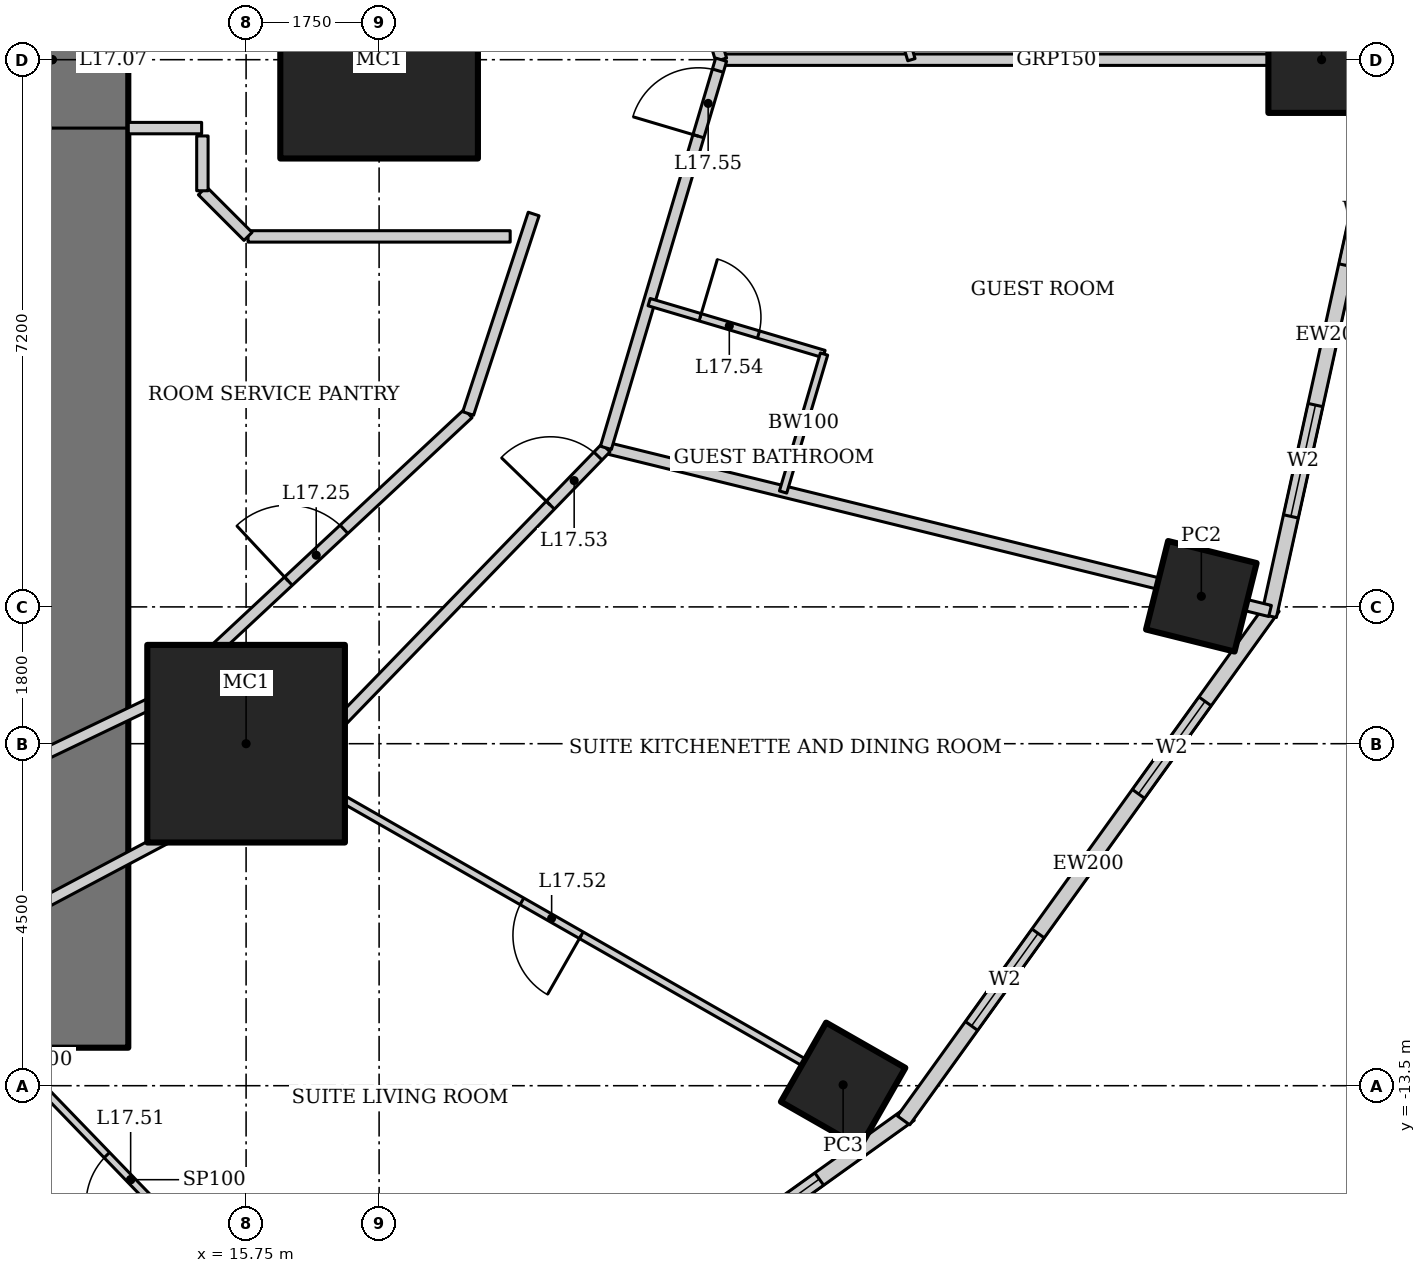
"""IFC4 building model, lengths in metres.
Left out: names, types, materials, properties, quantities, classifications, styles, units other than length and angle.
Written with IfcOpenShell. Run it as: python <this file> out.ifc"""

import sys

from ifc_helpers import new_model, si_unit, direction, frame, frame_2d, origin, origin_2d, place, context, subcontext, project, spatial, rectangle, hollow_rectangle, extrude, element, fill, save


model = new_model("IFC4")
c1 = context("Model", 3, precision=1e-05, world=origin(), true_north=direction((0.0, 1.0)))
c2 = subcontext(c1, "Body", "Model", "MODEL_VIEW")
j1 = project(units=[si_unit("LENGTHUNIT", "METRE"), si_unit("PLANEANGLEUNIT", "RADIAN")], contexts=[c1])
p1 = place(None, origin())
s1 = spatial("IfcSite", under=j1, at=p1, CompositionType="ELEMENT")
p2 = place(p1, origin())
s2 = spatial("IfcBuilding", under=s1, at=p2, CompositionType="ELEMENT")
p3 = place(p2, frame((0.0, 0.0, 76.6)))
s3 = spatial("IfcBuildingStorey", under=s2, at=p3, CompositionType="ELEMENT", Elevation=76.6)
for number, where, z_axis, x_axis in (
    (1, (17.5, 0.0, 0.0), (0.0, 0.0, 1.0), (1.0, 0.0, 0.0)),
    (2, (15.75, -9.0, 0.0), (0.0, 0.0, 1.0), (1.0, 0.0, 0.0)),
):
    element("IfcColumn", number, at=place(p3, frame(where, z_axis=z_axis, x_axis=x_axis)), inside=s3, PredefinedType="COLUMN", context=c2, shape_type="SweptSolid", body=[
        extrude(hollow_rectangle(XDim=2.6, YDim=2.6, WallThickness=0.13, at=origin_2d()), origin(), (0.0, 0.0, 1.0), 3.6),
    ])
p4 = place(p3, frame((29.9, 0.0, 0.0), z_axis=(0.0, 0.0, 1.0), x_axis=(1.0, 0.0, 0.0)))
e3 = element("IfcColumn", 3, at=p4, inside=s3, PredefinedType="COLUMN", context=c2, shape_type="SweptSolid", body=[
    extrude(hollow_rectangle(XDim=1.4, YDim=1.4, WallThickness=0.1, at=origin_2d()), origin(), (0.0, 0.0, 1.0), 3.6),
])
p5 = place(p3, frame((23.605, -13.489, 0.0), z_axis=(0.0, 0.0, 1.0), x_axis=(0.496139221777, 0.86824298017, 0.0)))
e4 = element("IfcColumn", 4, at=p5, inside=s3, PredefinedType="COLUMN", context=c2, shape_type="SweptSolid", body=[
    extrude(hollow_rectangle(XDim=1.2, YDim=1.2, WallThickness=0.12, at=origin_2d()), origin(), (0.0, 0.0, 1.0), 3.6),
])
p6 = place(p3, frame((28.318, -7.06, 0.0), z_axis=(0.0, 0.0, 1.0), x_axis=(0.2419218956, 0.970295726276, 0.0)))
e5 = element("IfcColumn", 5, at=p6, inside=s3, PredefinedType="COLUMN", context=c2, shape_type="SweptSolid", body=[
    extrude(hollow_rectangle(XDim=1.2, YDim=1.2, WallThickness=0.1, at=origin_2d()), origin(), (0.0, 0.0, 1.0), 3.6),
])
p7 = place(p3, frame((13.2, -13.0, 0.0), z_axis=(0.0, 0.0, 1.0), x_axis=(0.0, 1.0, 0.0)))
e6 = element("IfcWall", 6, at=p7, inside=s3, PredefinedType="SHEAR", context=c2, shape_type="SweptSolid", body=[
    extrude(rectangle(XDim=26.0, YDim=2.0, at=frame_2d((13.0, 0.0))), origin(), (0.0, 0.0, 1.0), 3.6),
])
p8 = place(p7, frame((12.1, 0.0, 0.0)))
e7 = element("IfcOpeningElement", 7, at=p8, cuts=e6, PredefinedType="OPENING", context=c2, shape_type="SweptSolid", body=[
    extrude(rectangle(XDim=1.8, YDim=2.1, at=frame_2d((0.9, 1.05))), frame((0.0, 1.01, 0.0), z_axis=(0.0, -1.0, 0.0), x_axis=(1.0, 0.0, 0.0)), (0.0, 0.0, 1.0), 2.02),
])
p9 = place(p3, frame((30.835, -0.067, 0.0), z_axis=(0.0, 0.0, 1.0), x_axis=(-0.215238065514, 0.976561608478, 0.0)))
e8 = element("IfcWall", 8, at=p9, inside=s3, PredefinedType="SOLIDWALL", context=c2, shape_type="SweptSolid", body=[
    extrude(rectangle(XDim=7.562, YDim=0.2, at=frame_2d((3.781, 0.0))), origin(), (0.0, 0.0, 1.0), 3.45),
])
p10 = place(p9, frame((1.341, 0.0, 0.5)))
e9 = element("IfcOpeningElement", 9, at=p10, cuts=e8, PredefinedType="OPENING", context=c2, shape_type="SweptSolid", body=[
    extrude(rectangle(XDim=1.5, YDim=2.2, at=frame_2d((0.75, 1.1))), frame((0.0, 0.11, 0.0), z_axis=(0.0, -1.0, 0.0), x_axis=(1.0, 0.0, 0.0)), (0.0, 0.0, 1.0), 0.22),
])
p11 = place(p9, frame((4.722, 0.0, 0.5)))
e10 = element("IfcOpeningElement", 10, at=p11, cuts=e8, PredefinedType="OPENING", context=c2, shape_type="SweptSolid", body=[
    extrude(rectangle(XDim=1.5, YDim=2.2, at=frame_2d((0.75, 1.1))), frame((0.0, 0.11, 0.0), z_axis=(0.0, -1.0, 0.0), x_axis=(1.0, 0.0, 0.0)), (0.0, 0.0, 1.0), 0.22),
])
p12 = place(p3, frame((17.929, -18.572, 0.0), z_axis=(0.0, 0.0, 1.0), x_axis=(0.812791321576, 0.582554948112, 0.0)))
e11 = element("IfcWall", 11, at=p12, inside=s3, PredefinedType="SOLIDWALL", context=c2, shape_type="SweptSolid", body=[
    extrude(rectangle(XDim=8.063, YDim=0.2, at=frame_2d((4.032, 0.0))), origin(), (0.0, 0.0, 1.0), 3.45),
])
p13 = place(p12, frame((1.466, 0.0, 0.5)))
e12 = element("IfcOpeningElement", 12, at=p13, cuts=e11, PredefinedType="OPENING", context=c2, shape_type="SweptSolid", body=[
    extrude(rectangle(XDim=1.5, YDim=2.2, at=frame_2d((0.75, 1.1))), frame((0.0, 0.11, 0.0), z_axis=(0.0, -1.0, 0.0), x_axis=(1.0, 0.0, 0.0)), (0.0, 0.0, 1.0), 0.22),
])
p14 = place(p12, frame((5.097, 0.0, 0.5)))
e13 = element("IfcOpeningElement", 13, at=p14, cuts=e11, PredefinedType="OPENING", context=c2, shape_type="SweptSolid", body=[
    extrude(rectangle(XDim=1.5, YDim=2.2, at=frame_2d((0.75, 1.1))), frame((0.0, 0.11, 0.0), z_axis=(0.0, -1.0, 0.0), x_axis=(1.0, 0.0, 0.0)), (0.0, 0.0, 1.0), 0.22),
])
p15 = place(p3, frame((24.4, -13.957, 0.0), z_axis=(0.0, 0.0, 1.0), x_axis=(0.583937613703, 0.811798536155, 0.0)))
e14 = element("IfcWall", 14, at=p15, inside=s3, PredefinedType="SOLIDWALL", context=c2, shape_type="SweptSolid", body=[
    extrude(rectangle(XDim=8.323, YDim=0.2, at=frame_2d((4.162, 0.0))), origin(), (0.0, 0.0, 1.0), 3.45),
])
p16 = place(p15, frame((1.531, 0.0, 0.5)))
e15 = element("IfcOpeningElement", 15, at=p16, cuts=e14, PredefinedType="OPENING", context=c2, shape_type="SweptSolid", body=[
    extrude(rectangle(XDim=1.5, YDim=2.2, at=frame_2d((0.75, 1.1))), frame((0.0, 0.11, 0.0), z_axis=(0.0, -1.0, 0.0), x_axis=(1.0, 0.0, 0.0)), (0.0, 0.0, 1.0), 0.22),
])
p17 = place(p15, frame((5.292, 0.0, 0.5)))
e16 = element("IfcOpeningElement", 16, at=p17, cuts=e14, PredefinedType="OPENING", context=c2, shape_type="SweptSolid", body=[
    extrude(rectangle(XDim=1.5, YDim=2.2, at=frame_2d((0.75, 1.1))), frame((0.0, 0.11, 0.0), z_axis=(0.0, -1.0, 0.0), x_axis=(1.0, 0.0, 0.0)), (0.0, 0.0, 1.0), 0.22),
])
p18 = place(p3, frame((29.208, -7.318, 0.0), z_axis=(0.0, 0.0, 1.0), x_axis=(0.215238065514, 0.976561608478, 0.0)))
e17 = element("IfcWall", 17, at=p18, inside=s3, PredefinedType="SOLIDWALL", context=c2, shape_type="SweptSolid", body=[
    extrude(rectangle(XDim=7.562, YDim=0.2, at=frame_2d((3.781, 0.0))), origin(), (0.0, 0.0, 1.0), 3.45),
])
p19 = place(p18, frame((1.341, 0.0, 0.5)))
e18 = element("IfcOpeningElement", 18, at=p19, cuts=e17, PredefinedType="OPENING", context=c2, shape_type="SweptSolid", body=[
    extrude(rectangle(XDim=1.5, YDim=2.2, at=frame_2d((0.75, 1.1))), frame((0.0, 0.11, 0.0), z_axis=(0.0, -1.0, 0.0), x_axis=(1.0, 0.0, 0.0)), (0.0, 0.0, 1.0), 0.22),
])
p20 = place(p18, frame((4.722, 0.0, 0.5)))
e19 = element("IfcOpeningElement", 19, at=p20, cuts=e17, PredefinedType="OPENING", context=c2, shape_type="SweptSolid", body=[
    extrude(rectangle(XDim=1.5, YDim=2.2, at=frame_2d((0.75, 1.1))), frame((0.0, 0.11, 0.0), z_axis=(0.0, -1.0, 0.0), x_axis=(1.0, 0.0, 0.0)), (0.0, 0.0, 1.0), 0.22),
])
p21 = place(p3, frame((30.821, 0.0, 0.0), z_axis=(0.0, 0.0, 1.0), x_axis=(-1.0, 0.0, 0.0)))
e20 = element("IfcWall", 20, at=p21, inside=s3, PredefinedType="PARTITIONING", context=c2, shape_type="SweptSolid", body=[
    extrude(rectangle(XDim=8.821, YDim=0.15, at=frame_2d((4.41, 0.0))), origin(), (0.0, 0.0, 1.0), 2.528),
])
p22 = place(p3, frame((29.222, -7.254, 0.0), z_axis=(0.0, 0.0, 1.0), x_axis=(-0.971128703136, 0.238556160989, 0.0)))
e21 = element("IfcWall", 21, at=p22, inside=s3, PredefinedType="PARTITIONING", context=c2, shape_type="SweptSolid", body=[
    extrude(rectangle(XDim=8.998, YDim=0.15, at=frame_2d((4.499, 0.0))), origin(), (0.0, 0.0, 1.0), 2.332),
])
p23 = place(p3, frame((22.0, 0.0, 0.0), z_axis=(0.0, 0.0, 1.0), x_axis=(-0.284584469409, 0.95865096869, 0.0)))
e22 = element("IfcWall", 22, at=p23, inside=s3, PredefinedType="PARTITIONING", context=c2, shape_type="SweptSolid", body=[
    extrude(rectangle(XDim=5.327, YDim=0.15, at=frame_2d((2.664, 0.0))), origin(), (0.0, 0.0, 1.0), 3.45),
])
p24 = place(p3, frame((11.519, -11.928, 0.0), z_axis=(0.0, 0.0, 1.0), x_axis=(0.883334368785, 0.468743419071, 0.0)))
e23 = element("IfcWall", 23, at=p24, inside=s3, PredefinedType="PARTITIONING", context=c2, shape_type="SweptSolid", body=[
    extrude(rectangle(XDim=5.491, YDim=0.15, at=frame_2d((2.746, 0.0))), origin(), (0.0, 0.0, 1.0), 3.45),
])
p25 = place(p3, frame((16.369, -9.354, 0.0), z_axis=(0.0, 0.0, 1.0), x_axis=(0.695871090686, 0.71816671125, 0.0)))
e24 = element("IfcWall", 24, at=p25, inside=s3, PredefinedType="PARTITIONING", context=c2, shape_type="SweptSolid", body=[
    extrude(rectangle(XDim=5.913, YDim=0.15, at=frame_2d((2.957, 0.0))), origin(), (0.0, 0.0, 1.0), 3.45),
])
p26 = place(p25, frame((4.863, 0.0, 0.0)))
e25 = element("IfcOpeningElement", 25, at=p26, cuts=e24, PredefinedType="OPENING", context=c2, shape_type="SweptSolid", body=[
    extrude(rectangle(XDim=0.9, YDim=2.1, at=frame_2d((0.45, 1.05))), frame((0.0, 0.085, 0.0), z_axis=(0.0, -1.0, 0.0), x_axis=(1.0, 0.0, 0.0)), (0.0, 0.0, 1.0), 0.17),
])
p27 = place(p3, frame((20.484, -5.107, 0.0), z_axis=(0.0, 0.0, 1.0), x_axis=(0.284584469409, 0.95865096869, 0.0)))
e26 = element("IfcWall", 26, at=p27, inside=s3, PredefinedType="PARTITIONING", context=c2, shape_type="SweptSolid", body=[
    extrude(rectangle(XDim=5.327, YDim=0.15, at=frame_2d((2.664, 0.0))), origin(), (0.0, 0.0, 1.0), 3.45),
])
p28 = place(p27, frame((4.278, 0.0, 0.0)))
e27 = element("IfcOpeningElement", 27, at=p28, cuts=e26, PredefinedType="OPENING", context=c2, shape_type="SweptSolid", body=[
    extrude(rectangle(XDim=0.9, YDim=2.1, at=frame_2d((0.45, 1.05))), frame((0.0, 0.085, 0.0), z_axis=(0.0, -1.0, 0.0), x_axis=(1.0, 0.0, 0.0)), (0.0, 0.0, 1.0), 0.17),
])
p29 = place(p3, frame((10.177, -10.539, 0.0), z_axis=(0.0, 0.0, 1.0), x_axis=(0.901869692799, 0.43200816799, 0.0)))
e28 = element("IfcWall", 28, at=p29, inside=s3, PredefinedType="PARTITIONING", context=c2, shape_type="SweptSolid", body=[
    extrude(rectangle(XDim=4.986, YDim=0.15, at=frame_2d((2.493, 0.0))), origin(), (0.0, 0.0, 1.0), 3.45),
])
p30 = place(p3, frame((14.673, -8.385, 0.0), z_axis=(0.0, 0.0, 1.0), x_axis=(0.731260145007, 0.682098673452, 0.0)))
e29 = element("IfcWall", 29, at=p30, inside=s3, PredefinedType="PARTITIONING", context=c2, shape_type="SweptSolid", body=[
    extrude(rectangle(XDim=5.468, YDim=0.15, at=frame_2d((2.734, 0.0))), origin(), (0.0, 0.0, 1.0), 3.45),
])
p31 = place(p30, frame((2.234, 0.0, 0.0)))
e30 = element("IfcOpeningElement", 30, at=p31, cuts=e29, PredefinedType="OPENING", context=c2, shape_type="SweptSolid", body=[
    extrude(rectangle(XDim=1.0, YDim=2.1, at=frame_2d((0.5, 1.05))), frame((0.0, 0.085, 0.0), z_axis=(0.0, -1.0, 0.0), x_axis=(1.0, 0.0, 0.0)), (0.0, 0.0, 1.0), 0.17),
])
p32 = place(p3, frame((23.732, 2.6, 0.0), z_axis=(0.0, 0.0, 1.0), x_axis=(0.284514277473, -0.958671803025, 0.0)))
e31 = element("IfcWall", 31, at=p32, inside=s3, PredefinedType="PARTITIONING", context=c2, shape_type="SweptSolid", body=[
    extrude(rectangle(XDim=2.712, YDim=0.1, at=frame_2d((1.356, 0.0))), origin(), (0.0, 0.0, 1.0), 3.45),
])
p33 = place(p3, frame((16.944, -17.545, 0.0), z_axis=(0.0, 0.0, 1.0), x_axis=(-0.694666479492, 0.719331969448, 0.0)))
e32 = element("IfcWall", 32, at=p33, inside=s3, PredefinedType="PARTITIONING", context=c2, shape_type="SweptSolid", body=[
    extrude(rectangle(XDim=7.81, YDim=0.1, at=frame_2d((3.905, 0.0))), origin(), (0.0, 0.0, 1.0), 2.528),
])
p34 = place(p33, frame((3.455, 0.0, 0.0)))
e33 = element("IfcOpeningElement", 33, at=p34, cuts=e32, PredefinedType="OPENING", context=c2, shape_type="SweptSolid", body=[
    extrude(rectangle(XDim=0.9, YDim=2.1, at=frame_2d((0.45, 1.05))), frame((0.0, 0.06, 0.0), z_axis=(0.0, -1.0, 0.0), x_axis=(1.0, 0.0, 0.0)), (0.0, 0.0, 1.0), 0.12),
])
p35 = place(p3, frame((23.171, -13.24, 0.0), z_axis=(0.0, 0.0, 1.0), x_axis=(-0.868243142124, 0.496138938357, 0.0)))
e34 = element("IfcWall", 34, at=p35, inside=s3, PredefinedType="PARTITIONING", context=c2, shape_type="SweptSolid", body=[
    extrude(rectangle(XDim=7.834, YDim=0.1, at=frame_2d((3.917, 0.0))), origin(), (0.0, 0.0, 1.0), 2.693),
])
p36 = place(p35, frame((3.467, 0.0, 0.0)))
e35 = element("IfcOpeningElement", 35, at=p36, cuts=e34, PredefinedType="OPENING", context=c2, shape_type="SweptSolid", body=[
    extrude(rectangle(XDim=0.9, YDim=2.1, at=frame_2d((0.45, 1.05))), frame((0.0, 0.06, 0.0), z_axis=(0.0, -1.0, 0.0), x_axis=(1.0, 0.0, 0.0)), (0.0, 0.0, 1.0), 0.12),
])
p37 = place(p3, frame((21.053, -3.19, 0.0), z_axis=(0.0, 0.0, 1.0), x_axis=(0.958667679126, -0.284528172593, 0.0)))
e36 = element("IfcWall", 36, at=p37, inside=s3, PredefinedType="PARTITIONING", context=c2, shape_type="SweptSolid", body=[
    extrude(rectangle(XDim=2.4, YDim=0.1, at=frame_2d((1.2, 0.0))), origin(), (0.0, 0.0, 1.0), 3.45),
])
p38 = place(p37, frame((0.7, 0.0, 0.0)))
e37 = element("IfcOpeningElement", 37, at=p38, cuts=e36, PredefinedType="OPENING", context=c2, shape_type="SweptSolid", body=[
    extrude(rectangle(XDim=0.8, YDim=2.1, at=frame_2d((0.4, 1.05))), frame((0.0, 0.06, 0.0), z_axis=(0.0, -1.0, 0.0), x_axis=(1.0, 0.0, 0.0)), (0.0, 0.0, 1.0), 0.12),
])
p39 = place(p3, frame((23.354, -3.873, 0.0), z_axis=(0.0, 0.0, 1.0), x_axis=(-0.284496480535, -0.958677084613, 0.0)))
e38 = element("IfcWall", 38, at=p39, inside=s3, PredefinedType="PARTITIONING", context=c2, shape_type="SweptSolid", body=[
    extrude(rectangle(XDim=1.894, YDim=0.1, at=frame_2d((0.947, 0.0))), origin(), (0.0, 0.0, 1.0), 3.45),
])
p40 = place(p3, frame((13.2, -13.0, 0.0), z_axis=(0.0, 0.0, 1.0), x_axis=(-0.719347134512, -0.69465077562, 0.0)))
e39 = element("IfcWall", 39, at=p40, inside=s3, PredefinedType="PARTITIONING", context=c2, shape_type="SweptSolid", body=[
    extrude(rectangle(XDim=0.465, YDim=0.1, at=frame_2d((0.232, 0.0))), origin(), (0.0, 0.0, 1.0), 3.45),
])
p41 = place(p3, frame((18.672, -4.655, 0.0), z_axis=(0.0, 0.0, 1.0), x_axis=(0.311929965981, 0.950105097515, 0.0)))
e40 = element("IfcWall", 40, at=p41, inside=s3, PredefinedType="PARTITIONING", context=c2, shape_type="SweptSolid", body=[
    extrude(rectangle(XDim=2.763, YDim=0.15, at=frame_2d((1.381, 0.0))), origin(), (0.0, 0.0, 1.0), 3.45),
])
p42 = place(p3, frame((14.2, -0.9, 0.0), z_axis=(0.0, 0.0, 1.0), x_axis=(1.0, 0.0, 0.0)))
e41 = element("IfcWall", 41, at=p42, inside=s3, PredefinedType="PARTITIONING", context=c2, shape_type="SweptSolid", body=[
    extrude(rectangle(XDim=0.965, YDim=0.15, at=frame_2d((0.482, 0.0))), origin(), (0.0, 0.0, 1.0), 3.45),
])
p43 = place(p3, frame((19.225, -2.325, 0.0), z_axis=(0.0, 0.0, 1.0), x_axis=(-1.0, 0.0, 0.0)))
e42 = element("IfcWall", 42, at=p43, inside=s3, PredefinedType="PARTITIONING", context=c2, shape_type="SweptSolid", body=[
    extrude(rectangle(XDim=3.449, YDim=0.15, at=frame_2d((1.725, 0.0))), origin(), (0.0, 0.0, 1.0), 3.45),
])
p44 = place(p3, frame((15.775, -2.325, 0.0), z_axis=(0.0, 0.0, 1.0), x_axis=(-0.707106781187, 0.707106781187, 0.0)))
e43 = element("IfcWall", 43, at=p44, inside=s3, PredefinedType="PARTITIONING", context=c2, shape_type="SweptSolid", body=[
    extrude(rectangle(XDim=0.849, YDim=0.15, at=frame_2d((0.425, 0.0))), origin(), (0.0, 0.0, 1.0), 3.45),
])
p45 = place(p3, frame((15.175, -1.725, 0.0), z_axis=(0.0, 0.0, 1.0), x_axis=(0.0, 1.0, 0.0)))
e44 = element("IfcWall", 44, at=p45, inside=s3, PredefinedType="PARTITIONING", context=c2, shape_type="SweptSolid", body=[
    extrude(rectangle(XDim=0.721, YDim=0.15, at=frame_2d((0.361, 0.0))), origin(), (0.0, 0.0, 1.0), 3.45),
])
p46 = place(p14, origin())
e45 = element("IfcWindow", 45, at=p46, inside=s3, PartitioningType="SINGLE_PANEL", PredefinedType="WINDOW", context=c2, shape_type="SweptSolid", body=[
    extrude(rectangle(XDim=1.5, YDim=2.2, at=frame_2d((0.75, 1.1))), frame((0.0, 0.03, 0.0), z_axis=(0.0, -1.0, 0.0), x_axis=(1.0, 0.0, 0.0)), (0.0, 0.0, 1.0), 0.06),
])
fill(e13, e45)
p47 = place(p16, origin())
e46 = element("IfcWindow", 46, at=p47, inside=s3, PartitioningType="SINGLE_PANEL", PredefinedType="WINDOW", context=c2, shape_type="SweptSolid", body=[
    extrude(rectangle(XDim=1.5, YDim=2.2, at=frame_2d((0.75, 1.1))), frame((0.0, 0.03, 0.0), z_axis=(0.0, -1.0, 0.0), x_axis=(1.0, 0.0, 0.0)), (0.0, 0.0, 1.0), 0.06),
])
fill(e15, e46)
p48 = place(p17, origin())
e47 = element("IfcWindow", 47, at=p48, inside=s3, PartitioningType="SINGLE_PANEL", PredefinedType="WINDOW", context=c2, shape_type="SweptSolid", body=[
    extrude(rectangle(XDim=1.5, YDim=2.2, at=frame_2d((0.75, 1.1))), frame((0.0, 0.03, 0.0), z_axis=(0.0, -1.0, 0.0), x_axis=(1.0, 0.0, 0.0)), (0.0, 0.0, 1.0), 0.06),
])
fill(e16, e47)
p49 = place(p19, origin())
e48 = element("IfcWindow", 48, at=p49, inside=s3, PartitioningType="SINGLE_PANEL", PredefinedType="WINDOW", context=c2, shape_type="SweptSolid", body=[
    extrude(rectangle(XDim=1.5, YDim=2.2, at=frame_2d((0.75, 1.1))), frame((0.0, 0.03, 0.0), z_axis=(0.0, -1.0, 0.0), x_axis=(1.0, 0.0, 0.0)), (0.0, 0.0, 1.0), 0.06),
])
fill(e18, e48)
p50 = place(p20, origin())
e49 = element("IfcWindow", 49, at=p50, inside=s3, PartitioningType="SINGLE_PANEL", PredefinedType="WINDOW", context=c2, shape_type="SweptSolid", body=[
    extrude(rectangle(XDim=1.5, YDim=2.2, at=frame_2d((0.75, 1.1))), frame((0.0, 0.03, 0.0), z_axis=(0.0, -1.0, 0.0), x_axis=(1.0, 0.0, 0.0)), (0.0, 0.0, 1.0), 0.06),
])
fill(e19, e49)
p51 = place(p8, origin())
e50 = element("IfcDoor", 50, at=p51, inside=s3, OperationType="DOUBLE_DOOR_DOUBLE_SWING", PredefinedType="DOOR", context=c2, shape_type="SweptSolid", body=[
    extrude(rectangle(XDim=1.8, YDim=2.1, at=frame_2d((0.9, 1.05))), frame((0.0, 0.025, 0.0), z_axis=(0.0, -1.0, 0.0), x_axis=(1.0, 0.0, 0.0)), (0.0, 0.0, 1.0), 0.05),
])
fill(e7, e50)
p52 = place(p31, origin())
e51 = element("IfcDoor", 51, at=p52, inside=s3, OperationType="SINGLE_SWING_LEFT", PredefinedType="DOOR", context=c2, shape_type="SweptSolid", body=[
    extrude(rectangle(XDim=1.0, YDim=2.1, at=frame_2d((0.5, 1.05))), frame((0.0, 0.025, 0.0), z_axis=(0.0, -1.0, 0.0), x_axis=(1.0, 0.0, 0.0)), (0.0, 0.0, 1.0), 0.05),
])
fill(e30, e51)
p53 = place(p34, origin())
e52 = element("IfcDoor", 52, at=p53, inside=s3, OperationType="SINGLE_SWING_LEFT", PredefinedType="DOOR", context=c2, shape_type="SweptSolid", body=[
    extrude(rectangle(XDim=0.9, YDim=2.1, at=frame_2d((0.45, 1.05))), frame((0.0, 0.025, 0.0), z_axis=(0.0, -1.0, 0.0), x_axis=(1.0, 0.0, 0.0)), (0.0, 0.0, 1.0), 0.05),
])
fill(e33, e52)
p54 = place(p36, origin())
e53 = element("IfcDoor", 53, at=p54, inside=s3, OperationType="SINGLE_SWING_LEFT", PredefinedType="DOOR", context=c2, shape_type="SweptSolid", body=[
    extrude(rectangle(XDim=0.9, YDim=2.1, at=frame_2d((0.45, 1.05))), frame((0.0, 0.025, 0.0), z_axis=(0.0, -1.0, 0.0), x_axis=(1.0, 0.0, 0.0)), (0.0, 0.0, 1.0), 0.05),
])
fill(e35, e53)
p55 = place(p26, origin())
e54 = element("IfcDoor", 54, at=p55, inside=s3, OperationType="SINGLE_SWING_LEFT", PredefinedType="DOOR", context=c2, shape_type="SweptSolid", body=[
    extrude(rectangle(XDim=0.9, YDim=2.1, at=frame_2d((0.45, 1.05))), frame((0.0, 0.025, 0.0), z_axis=(0.0, -1.0, 0.0), x_axis=(1.0, 0.0, 0.0)), (0.0, 0.0, 1.0), 0.05),
])
fill(e25, e54)
p56 = place(p38, origin())
e55 = element("IfcDoor", 55, at=p56, inside=s3, OperationType="SINGLE_SWING_LEFT", PredefinedType="DOOR", context=c2, shape_type="SweptSolid", body=[
    extrude(rectangle(XDim=0.8, YDim=2.1, at=frame_2d((0.4, 1.05))), frame((0.0, 0.025, 0.0), z_axis=(0.0, -1.0, 0.0), x_axis=(1.0, 0.0, 0.0)), (0.0, 0.0, 1.0), 0.05),
])
fill(e37, e55)
p57 = place(p28, origin())
e56 = element("IfcDoor", 56, at=p57, inside=s3, OperationType="SINGLE_SWING_LEFT", PredefinedType="DOOR", context=c2, shape_type="SweptSolid", body=[
    extrude(rectangle(XDim=0.9, YDim=2.1, at=frame_2d((0.45, 1.05))), frame((0.0, 0.025, 0.0), z_axis=(0.0, -1.0, 0.0), x_axis=(1.0, 0.0, 0.0)), (0.0, 0.0, 1.0), 0.05),
])
fill(e27, e56)
save(model, sys.argv[1])
